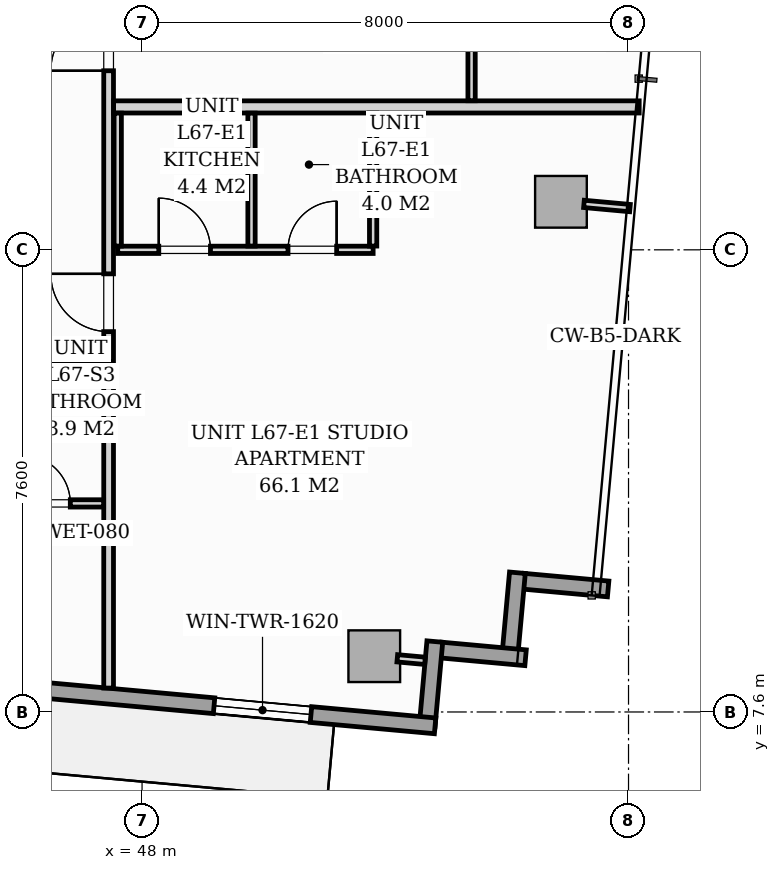
"""IFC4 building model, lengths in metres.
Left out: names, types, materials, properties, quantities, classifications, styles, units other than length and angle.
Written with IfcOpenShell. Run it as: python <this file> out.ifc"""

import sys

from ifc_helpers import new_model, si_unit, direction, frame, frame_2d, origin, origin_2d, place, context, subcontext, project, spatial, rectangle, extrude, source, transform, mapped, element, fill, save


model = new_model("IFC4")
c1 = context("Model", 3, precision=1e-05, world=origin(), true_north=direction((0.0, 1.0)))
c2 = subcontext(c1, "Body", "Model", "MODEL_VIEW")
j1 = project(units=[si_unit("LENGTHUNIT", "METRE"), si_unit("PLANEANGLEUNIT", "RADIAN")], contexts=[c1])
p1 = place(None, origin())
s1 = spatial("IfcSite", under=j1, at=p1, CompositionType="ELEMENT")
p2 = place(p1, origin())
s2 = spatial("IfcBuilding", under=s1, at=p2, CompositionType="ELEMENT")
p3 = place(p2, frame((0.0, 0.0, 233.1)))
s3 = spatial("IfcBuildingStorey", under=s2, at=p3, CompositionType="ELEMENT", Elevation=233.1)
m1 = source(origin(), c2, "Body", "SweptSolid", [
    extrude(rectangle(XDim=0.85, YDim=0.85, at=origin_2d()), origin(), (0.0, 0.0, 1.0), 3.296),
])
for number, where, z_axis, x_axis in (
    (1, (51.819, 8.517, 0.002), (0.0, 0.0, 1.0), (0.996, -0.091, 0.0)),
    (2, (54.889, 15.99, 0.002), (0.0, 0.0, 1.0), (0.996, -0.091, 0.0)),
):
    element("IfcColumn", number, at=place(p3, frame(where, z_axis=z_axis, x_axis=x_axis)), inside=s3, PredefinedType="COLUMN", context=c2, shape_type="MappedRepresentation", body=[
        mapped(m1, transform((0.0, 0.0, 0.0), scale=1.0)),
    ])
for number, where, z_axis, x_axis in (
    (3, (55.665, 9.623, 0.0), (0.0, 0.0, 1.0), (-0.996, 0.091, 0.0)),
    (4, (54.173, 9.889, 0.0), (0.0, 0.0, 1.0), (-0.091, -0.996, 0.0)),
):
    element("IfcWall", number, at=place(p3, frame(where, z_axis=z_axis, x_axis=x_axis)), inside=s3, PredefinedType="STANDARD", context=c2, shape_type="SweptSolid", body=[
        extrude(rectangle(XDim=1.395, YDim=0.26, at=frame_2d((0.698, 0.0))), origin(), (0.0, 0.0, 1.0), 3.04),
    ])
for number, where, z_axis, x_axis in (
    (5, (54.307, 8.492, 0.0), (0.0, 0.0, 1.0), (-0.996, 0.091, 0.0)),
    (6, (52.815, 8.758, 0.0), (0.0, 0.0, 1.0), (-0.091, -0.996, 0.0)),
):
    element("IfcWall", number, at=place(p3, frame(where, z_axis=z_axis, x_axis=x_axis)), inside=s3, PredefinedType="STANDARD", context=c2, shape_type="SweptSolid", body=[
        extrude(rectangle(XDim=1.395, YDim=0.26, at=frame_2d((0.698, 0.0))), origin(), (0.0, 0.0, 1.0), 3.04),
    ])
p4 = place(p3, frame((52.819, 7.372, 0.0), z_axis=(0.0, 0.0, 1.0), x_axis=(-0.995884447498, 0.090632043071, 0.0)))
e7 = element("IfcWall", 7, at=p4, inside=s3, PredefinedType="STANDARD", context=c2, shape_type="SweptSolid", body=[
    extrude(rectangle(XDim=14.63, YDim=0.26, at=frame_2d((7.315, 0.0))), origin(), (0.0, 0.0, 1.0), 3.04),
])
p5 = place(p4, frame((7.037, 0.0, 0.0)))
e8 = element("IfcOpeningElement", 8, at=p5, cuts=e7, PredefinedType="OPENING", context=c2, shape_type="SweptSolid", body=[
    extrude(rectangle(XDim=1.8, YDim=2.06, at=frame_2d((0.9, 1.03))), frame((0.0, 0.14, 0.0), z_axis=(0.0, -1.0, 0.0), x_axis=(1.0, 0.0, 0.0)), (0.0, 0.0, 1.0), 0.28),
])
p6 = place(p4, frame((2.05, 0.0, 0.65)))
e9 = element("IfcOpeningElement", 9, at=p6, cuts=e7, PredefinedType="OPENING", context=c2, shape_type="SweptSolid", body=[
    extrude(rectangle(XDim=1.6, YDim=1.5, at=frame_2d((0.8, 0.75))), frame((0.0, 0.14, 0.0), z_axis=(0.0, -1.0, 0.0), x_axis=(1.0, 0.0, 0.0)), (0.0, 0.0, 1.0), 0.28),
])
p7 = place(p3, frame((26.12, 13.28, 0.0), z_axis=(0.0, 0.0, 1.0), x_axis=(1.0, 0.0, 0.0)))
e10 = element("IfcWall", 10, at=p7, inside=s3, PredefinedType="PARTITIONING", context=c2, shape_type="SweptSolid", body=[
    extrude(rectangle(XDim=21.33, YDim=0.16, at=frame_2d((10.665, 0.0))), origin(), (0.0, 0.0, 1.0), 2.556),
])
p8 = place(p7, frame((4.704, 0.0, 0.0)))
e11 = element("IfcOpeningElement", 11, at=p8, cuts=e10, PredefinedType="OPENING", context=c2, shape_type="SweptSolid", body=[
    extrude(rectangle(XDim=0.95, YDim=2.06, at=frame_2d((0.475, 1.03))), frame((0.0, 0.09, 0.0), z_axis=(0.0, -1.0, 0.0), x_axis=(1.0, 0.0, 0.0)), (0.0, 0.0, 1.0), 0.18),
])
p9 = place(p7, frame((7.5, 0.0, 0.0)))
e12 = element("IfcOpeningElement", 12, at=p9, cuts=e10, PredefinedType="OPENING", context=c2, shape_type="SweptSolid", body=[
    extrude(rectangle(XDim=0.95, YDim=2.06, at=frame_2d((0.475, 1.03))), frame((0.0, 0.09, 0.0), z_axis=(0.0, -1.0, 0.0), x_axis=(1.0, 0.0, 0.0)), (0.0, 0.0, 1.0), 0.18),
])
p10 = place(p7, frame((14.976, 0.0, 0.0)))
e13 = element("IfcOpeningElement", 13, at=p10, cuts=e10, PredefinedType="OPENING", context=c2, shape_type="SweptSolid", body=[
    extrude(rectangle(XDim=0.95, YDim=2.06, at=frame_2d((0.475, 1.03))), frame((0.0, 0.09, 0.0), z_axis=(0.0, -1.0, 0.0), x_axis=(1.0, 0.0, 0.0)), (0.0, 0.0, 1.0), 0.18),
])
p11 = place(p3, frame((47.45, 7.993, 0.0), z_axis=(0.0, 0.0, 1.0), x_axis=(0.0, 1.0, 0.0)))
e14 = element("IfcWall", 14, at=p11, inside=s3, PredefinedType="PARTITIONING", context=c2, shape_type="SweptSolid", body=[
    extrude(rectangle(XDim=5.205, YDim=0.16, at=frame_2d((2.603, 0.0))), origin(), (0.0, 0.0, 1.0), 3.04),
])
p12 = place(p3, frame((47.45, 13.362, 0.0), z_axis=(0.0, 0.0, 1.0), x_axis=(0.0, 1.0, 0.0)))
e15 = element("IfcWall", 15, at=p12, inside=s3, PredefinedType="PARTITIONING", context=c2, shape_type="SweptSolid", body=[
    extrude(rectangle(XDim=7.288, YDim=0.16, at=frame_2d((3.644, 0.0))), origin(), (0.0, 0.0, 1.0), 3.04),
])
p13 = place(p12, frame((0.493, 0.0, 0.0)))
e16 = element("IfcOpeningElement", 16, at=p13, cuts=e15, PredefinedType="OPENING", context=c2, shape_type="SweptSolid", body=[
    extrude(rectangle(XDim=0.95, YDim=2.06, at=frame_2d((0.475, 1.03))), frame((0.0, 0.09, 0.0), z_axis=(0.0, -1.0, 0.0), x_axis=(1.0, 0.0, 0.0)), (0.0, 0.0, 1.0), 0.18),
])
p14 = place(p12, frame((4.783, 0.0, 0.0)))
e17 = element("IfcOpeningElement", 17, at=p14, cuts=e15, PredefinedType="OPENING", context=c2, shape_type="SweptSolid", body=[
    extrude(rectangle(XDim=0.95, YDim=2.06, at=frame_2d((0.475, 1.03))), frame((0.0, 0.09, 0.0), z_axis=(0.0, -1.0, 0.0), x_axis=(1.0, 0.0, 0.0)), (0.0, 0.0, 1.0), 0.18),
])
p15 = place(p3, frame((43.27, 11.03, 0.0), z_axis=(0.0, 0.0, 1.0), x_axis=(1.0, 0.0, 0.0)))
e18 = element("IfcWall", 18, at=p15, inside=s3, PredefinedType="PARTITIONING", context=c2, shape_type="SweptSolid", body=[
    extrude(rectangle(XDim=4.098, YDim=0.12, at=frame_2d((2.049, 0.0))), origin(), (0.0, 0.0, 1.0), 3.04),
])
p16 = place(p15, frame((0.675, 0.0, 0.0)))
e19 = element("IfcOpeningElement", 19, at=p16, cuts=e18, PredefinedType="OPENING", context=c2, shape_type="SweptSolid", body=[
    extrude(rectangle(XDim=0.85, YDim=2.05, at=frame_2d((0.425, 1.025))), frame((0.0, 0.07, 0.0), z_axis=(0.0, -1.0, 0.0), x_axis=(1.0, 0.0, 0.0)), (0.0, 0.0, 1.0), 0.14),
])
p17 = place(p15, frame((2.75, 0.0, 0.0)))
e20 = element("IfcOpeningElement", 20, at=p17, cuts=e18, PredefinedType="OPENING", context=c2, shape_type="SweptSolid", body=[
    extrude(rectangle(XDim=0.8, YDim=2.02, at=frame_2d((0.4, 1.01))), frame((0.0, 0.07, 0.0), z_axis=(0.0, -1.0, 0.0), x_axis=(1.0, 0.0, 0.0)), (0.0, 0.0, 1.0), 0.14),
])
p18 = place(p3, frame((47.532, 17.55, 0.0), z_axis=(0.0, 0.0, 1.0), x_axis=(1.0, 0.0, 0.0)))
e21 = element("IfcWall", 21, at=p18, inside=s3, PredefinedType="PARTITIONING", context=c2, shape_type="SweptSolid", body=[
    extrude(rectangle(XDim=8.643, YDim=0.2, at=frame_2d((4.322, 0.0))), origin(), (0.0, 0.0, 1.0), 3.04),
])
p19 = place(p3, frame((47.6, 15.2, 0.0), z_axis=(0.0, 0.0, 1.0), x_axis=(1.0, 0.0, 0.0)))
e22 = element("IfcWall", 22, at=p19, inside=s3, PredefinedType="PARTITIONING", context=c2, shape_type="SweptSolid", body=[
    extrude(rectangle(XDim=4.2, YDim=0.12, at=frame_2d((2.1, 0.0))), origin(), (0.0, 0.0, 1.0), 3.04),
])
p20 = place(p19, frame((0.675, 0.0, 0.0)))
e23 = element("IfcOpeningElement", 23, at=p20, cuts=e22, PredefinedType="OPENING", context=c2, shape_type="SweptSolid", body=[
    extrude(rectangle(XDim=0.85, YDim=2.05, at=frame_2d((0.425, 1.025))), frame((0.0, 0.07, 0.0), z_axis=(0.0, -1.0, 0.0), x_axis=(1.0, 0.0, 0.0)), (0.0, 0.0, 1.0), 0.14),
])
p21 = place(p19, frame((2.8, 0.0, 0.0)))
e24 = element("IfcOpeningElement", 24, at=p21, cuts=e22, PredefinedType="OPENING", context=c2, shape_type="SweptSolid", body=[
    extrude(rectangle(XDim=0.8, YDim=2.02, at=frame_2d((0.4, 1.01))), frame((0.0, 0.07, 0.0), z_axis=(0.0, -1.0, 0.0), x_axis=(1.0, 0.0, 0.0)), (0.0, 0.0, 1.0), 0.14),
])
for number, where, z_axis, x_axis in (
    (25, (47.6, 15.262, 0.0), (0.0, 0.0, 1.0), (0.0, 1.0, 0.0)),
    (26, (49.8, 15.262, 0.0), (0.0, 0.0, 1.0), (0.0, 1.0, 0.0)),
    (27, (51.8, 15.262, 0.0), (0.0, 0.0, 1.0), (0.0, 1.0, 0.0)),
):
    element("IfcWall", number, at=place(p3, frame(where, z_axis=z_axis, x_axis=x_axis)), inside=s3, PredefinedType="PARTITIONING", context=c2, shape_type="SweptSolid", body=[
        extrude(rectangle(XDim=2.186, YDim=0.12, at=frame_2d((1.093, 0.0))), origin(), (0.0, 0.0, 1.0), 3.04),
    ])
p22 = place(p3, frame((53.419, 17.652, 0.0), z_axis=(0.0, 0.0, 1.0), x_axis=(0.0, 1.0, 0.0)))
e28 = element("IfcWall", 28, at=p22, inside=s3, PredefinedType="PARTITIONING", context=c2, shape_type="SweptSolid", body=[
    extrude(rectangle(XDim=7.145, YDim=0.12, at=frame_2d((3.573, 0.0))), origin(), (0.0, 0.0, 1.0), 2.482),
])
p23 = place(p22, frame((2.636, 0.0, 0.0)))
e29 = element("IfcOpeningElement", 29, at=p23, cuts=e28, PredefinedType="OPENING", context=c2, shape_type="SweptSolid", body=[
    extrude(rectangle(XDim=0.85, YDim=2.05, at=frame_2d((0.425, 1.025))), frame((0.0, 0.07, 0.0), z_axis=(0.0, -1.0, 0.0), x_axis=(1.0, 0.0, 0.0)), (0.0, 0.0, 1.0), 0.14),
])
p24 = place(p3, frame((52.197, 8.483, 0.0), z_axis=(0.0, 0.0, 1.0), x_axis=(0.995884462012, -0.090631883588, 0.0)))
e30 = element("IfcWall", 30, at=p24, inside=s3, PredefinedType="PARTITIONING", context=c2, shape_type="SweptSolid", body=[
    extrude(rectangle(XDim=0.458, YDim=0.12, at=frame_2d((0.229, 0.0))), origin(), (0.0, 0.0, 1.0), 3.04),
])
p25 = place(p3, frame((55.267, 15.955, 0.0), z_axis=(0.0, 0.0, 1.0), x_axis=(0.995887938321, -0.09059367697, 0.0)))
e31 = element("IfcWall", 31, at=p25, inside=s3, PredefinedType="PARTITIONING", context=c2, shape_type="SweptSolid", body=[
    extrude(rectangle(XDim=0.76, YDim=0.12, at=frame_2d((0.38, 0.0))), origin(), (0.0, 0.0, 1.0), 3.04),
])
m2 = source(origin(), c2, "Body", "SweptSolid", [
    extrude(rectangle(XDim=1.6, YDim=1.5, at=frame_2d((0.8, 0.75))), frame((0.0, 0.03, 0.0), z_axis=(0.0, -1.0, 0.0), x_axis=(1.0, 0.0, 0.0)), (0.0, 0.0, 1.0), 0.06),
])
p26 = place(p6, origin())
e32 = element("IfcWindow", 32, at=p26, inside=s3, PartitioningType="SINGLE_PANEL", PredefinedType="WINDOW", context=c2, shape_type="MappedRepresentation", body=[
    mapped(m2, transform((0.0, 0.0, 0.0), scale=1.0)),
])
fill(e9, e32)
m3 = source(origin(), c2, "Body", "SweptSolid", [
    extrude(rectangle(XDim=0.8, YDim=2.02, at=frame_2d((0.4, 1.01))), frame((0.0, 0.025, 0.0), z_axis=(0.0, -1.0, 0.0), x_axis=(1.0, 0.0, 0.0)), (0.0, 0.0, 1.0), 0.05),
])
p27 = place(p17, origin())
e33 = element("IfcDoor", 33, at=p27, inside=s3, OperationType="SINGLE_SWING_LEFT", PredefinedType="DOOR", context=c2, shape_type="MappedRepresentation", body=[
    mapped(m3, transform((0.0, 0.0, 0.0), scale=1.0)),
])
fill(e20, e33)
m4 = source(origin(), c2, "Body", "SweptSolid", [
    extrude(rectangle(XDim=0.95, YDim=2.06, at=frame_2d((0.475, 1.03))), frame((0.0, 0.025, 0.0), z_axis=(0.0, -1.0, 0.0), x_axis=(1.0, 0.0, 0.0)), (0.0, 0.0, 1.0), 0.05),
])
p28 = place(p13, origin())
e34 = element("IfcDoor", 34, at=p28, inside=s3, OperationType="SINGLE_SWING_RIGHT", PredefinedType="DOOR", context=c2, shape_type="MappedRepresentation", body=[
    mapped(m4, transform((0.0, 0.0, 0.0), scale=1.0)),
])
fill(e16, e34)
m5 = source(origin(), c2, "Body", "SweptSolid", [
    extrude(rectangle(XDim=0.85, YDim=2.05, at=frame_2d((0.425, 1.025))), frame((0.0, 0.025, 0.0), z_axis=(0.0, -1.0, 0.0), x_axis=(1.0, 0.0, 0.0)), (0.0, 0.0, 1.0), 0.05),
])
p29 = place(p20, origin())
e35 = element("IfcDoor", 35, at=p29, inside=s3, OperationType="SINGLE_SWING_LEFT", PredefinedType="DOOR", context=c2, shape_type="MappedRepresentation", body=[
    mapped(m5, transform((0.0, 0.0, 0.0), scale=1.0)),
])
fill(e23, e35)
p30 = place(p21, origin())
e36 = element("IfcDoor", 36, at=p30, inside=s3, OperationType="SINGLE_SWING_RIGHT", PredefinedType="DOOR", context=c2, shape_type="MappedRepresentation", body=[
    mapped(m3, transform((0.0, 0.0, 0.0), scale=1.0)),
])
fill(e24, e36)
p31 = place(p14, origin())
e37 = element("IfcDoor", 37, at=p31, inside=s3, OperationType="SINGLE_SWING_LEFT", PredefinedType="DOOR", context=c2, shape_type="MappedRepresentation", body=[
    mapped(m4, transform((0.0, 0.0, 0.0), scale=1.0)),
])
fill(e17, e37)
save(model, sys.argv[1])
